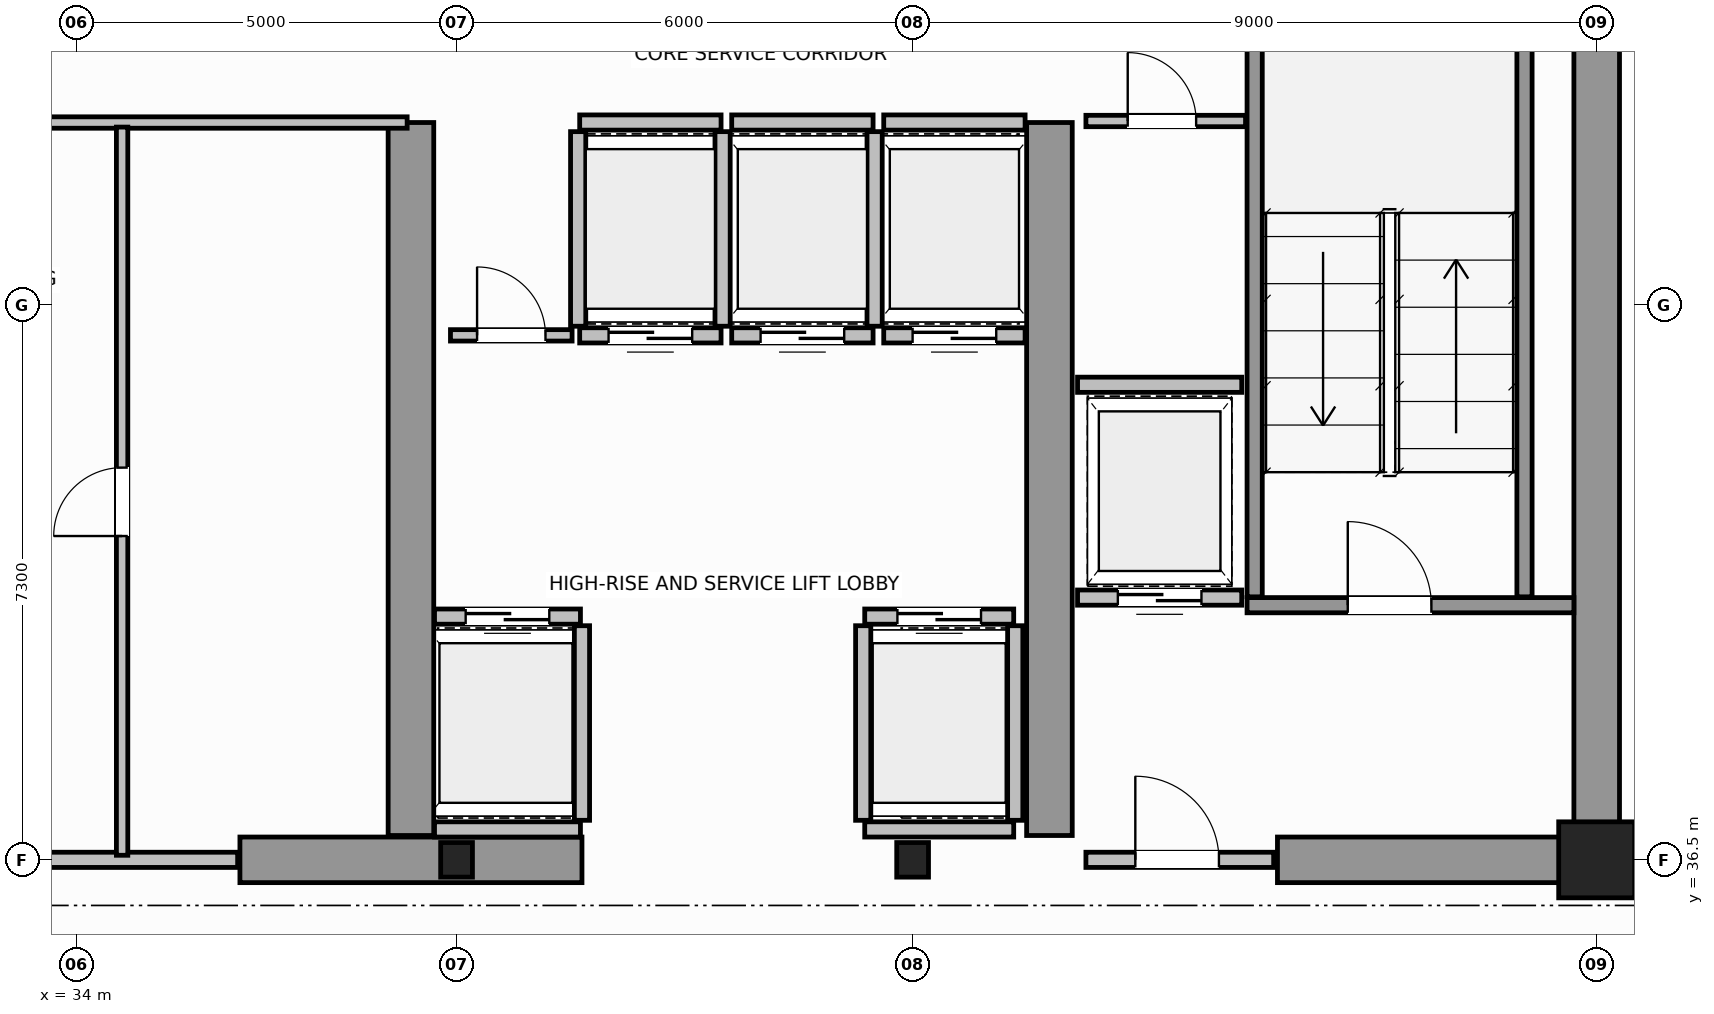
"""IFC4 building model, lengths in metres.
Left out: names, types, materials, properties, quantities, classifications, styles, units other than length and angle.
Written with IfcOpenShell. Run it as: python <this file> out.ifc"""

import sys

from ifc_helpers import new_model, si_unit, direction, frame, frame_2d, origin, origin_2d, place, context, subcontext, project, spatial, rectangle, i_section, extrude, source, transform, mapped, element, fill, save


model = new_model("IFC4")
c1 = context("Model", 3, precision=1e-05, world=origin(), true_north=direction((0.0, 1.0)))
c2 = subcontext(c1, "Body", "Model", "MODEL_VIEW")
j1 = project(units=[si_unit("LENGTHUNIT", "METRE"), si_unit("PLANEANGLEUNIT", "RADIAN")], contexts=[c1])
p1 = place(None, origin())
s1 = spatial("IfcSite", under=j1, at=p1, CompositionType="ELEMENT")
p2 = place(p1, origin())
s2 = spatial("IfcBuilding", under=s1, at=p2, CompositionType="ELEMENT")
p3 = place(p2, frame((0.0, 0.0, 234.6)))
s3 = spatial("IfcBuildingStorey", under=s2, at=p3, CompositionType="ELEMENT", Elevation=234.6)
m1 = source(origin(), c2, "Body", "SweptSolid", [
    extrude(i_section(OverallWidth=0.418, OverallDepth=0.455, WebThickness=0.042, FlangeThickness=0.058, FilletRadius=0.015, at=origin_2d()), origin(), (0.0, 0.0, 1.0), 3.8),
])
for number, where, z_axis, x_axis in (
    (1, (39.0, 36.5, 0.0), (0.0, 0.0, 1.0), (1.0, 0.0, 0.0)),
    (2, (45.0, 36.5, 0.0), (0.0, 0.0, 1.0), (1.0, 0.0, 0.0)),
):
    element("IfcColumn", number, at=place(p3, frame(where, z_axis=z_axis, x_axis=x_axis)), inside=s3, PredefinedType="COLUMN", context=c2, shape_type="MappedRepresentation", body=[
        mapped(m1, transform((0.0, 0.0, 0.0), scale=1.0)),
    ])
m2 = source(origin(), c2, "Body", "SweptSolid", [
    extrude(rectangle(XDim=1.0, YDim=1.0, at=origin_2d()), origin(), (0.0, 0.0, 1.0), 3.8),
])
p4 = place(p3, frame((54.0, 36.5, 0.0), z_axis=(0.0, 0.0, 1.0), x_axis=(1.0, 0.0, 0.0)))
e3 = element("IfcColumn", 3, at=p4, inside=s3, PredefinedType="COLUMN", context=c2, shape_type="MappedRepresentation", body=[
    mapped(m2, transform((0.0, 0.0, 0.0), scale=1.0)),
])
p5 = place(p3, frame((54.0, 36.5, 0.0), z_axis=(0.0, 0.0, 1.0), x_axis=(0.0, 1.0, 0.0)))
e4 = element("IfcWall", 4, at=p5, inside=s3, PredefinedType="SHEAR", context=c2, shape_type="SweptSolid", body=[
    extrude(rectangle(XDim=14.5, YDim=0.6, at=frame_2d((7.25, 0.0))), origin(), (0.0, 0.0, 1.0), 3.8),
])
p6 = place(p3, frame((36.15, 36.5, 0.0), z_axis=(0.0, 0.0, 1.0), x_axis=(1.0, 0.0, 0.0)))
e5 = element("IfcWall", 5, at=p6, inside=s3, PredefinedType="SHEAR", context=c2, shape_type="SweptSolid", body=[
    extrude(rectangle(XDim=4.5, YDim=0.6, at=frame_2d((2.25, 0.0))), origin(), (0.0, 0.0, 1.0), 3.8),
])
p7 = place(p3, frame((49.8, 36.5, 0.0), z_axis=(0.0, 0.0, 1.0), x_axis=(1.0, 0.0, 0.0)))
e6 = element("IfcWall", 6, at=p7, inside=s3, PredefinedType="SHEAR", context=c2, shape_type="SweptSolid", body=[
    extrude(rectangle(XDim=3.88, YDim=0.6, at=frame_2d((1.94, 0.0))), origin(), (0.0, 0.0, 1.0), 2.58),
])
for number, where, z_axis, x_axis in (
    (7, (38.4, 36.82, 0.0), (0.0, 0.0, 1.0), (0.0, 1.0, 0.0)),
    (8, (46.8, 36.82, 0.0), (0.0, 0.0, 1.0), (0.0, 1.0, 0.0)),
):
    element("IfcWall", number, at=place(p3, frame(where, z_axis=z_axis, x_axis=x_axis)), inside=s3, PredefinedType="SHEAR", context=c2, shape_type="SweptSolid", body=[
        extrude(rectangle(XDim=9.38, YDim=0.6, at=frame_2d((4.69, 0.0))), origin(), (0.0, 0.0, 1.0), 3.8),
    ])
p8 = place(p3, frame((49.4, 39.85, 0.0), z_axis=(0.0, 0.0, 1.0), x_axis=(1.0, 0.0, 0.0)))
e9 = element("IfcWall", 9, at=p8, inside=s3, PredefinedType="SOLIDWALL", context=c2, shape_type="SweptSolid", body=[
    extrude(rectangle(XDim=4.3, YDim=0.2, at=frame_2d((2.15, 0.0))), origin(), (0.0, 0.0, 1.0), 3.8),
])
p9 = place(p8, frame((1.325, 0.0, 0.0)))
e10 = element("IfcOpeningElement", 10, at=p9, cuts=e9, PredefinedType="OPENING", context=c2, shape_type="SweptSolid", body=[
    extrude(rectangle(XDim=1.1, YDim=2.15, at=frame_2d((0.55, 1.075))), frame((0.0, 0.11, 0.0), z_axis=(0.0, -1.0, 0.0), x_axis=(1.0, 0.0, 0.0)), (0.0, 0.0, 1.0), 0.22),
])
for number, where, z_axis, x_axis in (
    (11, (49.5, 39.96, 0.0), (0.0, 0.0, 1.0), (0.0, 1.0, 0.0)),
    (12, (53.05, 39.96, 0.0), (0.0, 0.0, 1.0), (0.0, 1.0, 0.0)),
):
    element("IfcWall", number, at=place(p3, frame(where, z_axis=z_axis, x_axis=x_axis)), inside=s3, PredefinedType="SOLIDWALL", context=c2, shape_type="SweptSolid", body=[
        extrude(rectangle(XDim=9.93, YDim=0.2, at=frame_2d((4.965, 0.0))), origin(), (0.0, 0.0, 1.0), 3.8),
    ])
p10 = place(p3, frame((47.28, 36.5, 0.0), z_axis=(0.0, 0.0, 1.0), x_axis=(1.0, 0.0, 0.0)))
e13 = element("IfcWall", 13, at=p10, inside=s3, PredefinedType="SOLIDWALL", context=c2, shape_type="SweptSolid", body=[
    extrude(rectangle(XDim=2.47, YDim=0.2, at=frame_2d((1.235, 0.0))), origin(), (0.0, 0.0, 1.0), 2.57),
])
p11 = place(p10, frame((0.65, 0.0, 0.0)))
e14 = element("IfcOpeningElement", 14, at=p11, cuts=e13, PredefinedType="OPENING", context=c2, shape_type="SweptSolid", body=[
    extrude(rectangle(XDim=1.1, YDim=2.15, at=frame_2d((0.55, 1.075))), frame((0.0, 0.11, 0.0), z_axis=(0.0, -1.0, 0.0), x_axis=(1.0, 0.0, 0.0)), (0.0, 0.0, 1.0), 0.22),
])
p12 = place(p3, frame((38.71, 39.7, 0.0), z_axis=(0.0, 0.0, 1.0), x_axis=(1.0, 0.0, 0.0)))
e15 = element("IfcWall", 15, at=p12, inside=s3, PredefinedType="SOLIDWALL", context=c2, shape_type="SweptSolid", body=[
    extrude(rectangle(XDim=1.92, YDim=0.2, at=frame_2d((0.96, 0.0))), origin(), (0.0, 0.0, 1.0), 3.58),
])
p13 = place(p12, frame((0.41, 0.0, 0.0)))
e16 = element("IfcOpeningElement", 16, at=p13, cuts=e15, PredefinedType="OPENING", context=c2, shape_type="SweptSolid", body=[
    extrude(rectangle(XDim=1.1, YDim=2.15, at=frame_2d((0.55, 1.075))), frame((0.0, 0.11, 0.0), z_axis=(0.0, -1.0, 0.0), x_axis=(1.0, 0.0, 0.0)), (0.0, 0.0, 1.0), 0.22),
])
p14 = place(p3, frame((38.71, 36.9, 0.0), z_axis=(0.0, 0.0, 1.0), x_axis=(1.0, 0.0, 0.0)))
e17 = element("IfcWall", 17, at=p14, inside=s3, PredefinedType="SOLIDWALL", context=c2, shape_type="SweptSolid", body=[
    extrude(rectangle(XDim=1.92, YDim=0.2, at=frame_2d((0.96, 0.0))), origin(), (0.0, 0.0, 1.0), 2.37),
])
p15 = place(p3, frame((40.65, 37.02, 0.0), z_axis=(0.0, 0.0, 1.0), x_axis=(0.0, 1.0, 0.0)))
e18 = element("IfcWall", 18, at=p15, inside=s3, PredefinedType="SOLIDWALL", context=c2, shape_type="SweptSolid", body=[
    extrude(rectangle(XDim=2.56, YDim=0.2, at=frame_2d((1.28, 0.0))), origin(), (0.0, 0.0, 1.0), 3.58),
])
p16 = place(p3, frame((44.37, 39.7, 0.0), z_axis=(0.0, 0.0, 1.0), x_axis=(1.0, 0.0, 0.0)))
e19 = element("IfcWall", 19, at=p16, inside=s3, PredefinedType="SOLIDWALL", context=c2, shape_type="SweptSolid", body=[
    extrude(rectangle(XDim=1.96, YDim=0.2, at=frame_2d((0.98, 0.0))), origin(), (0.0, 0.0, 1.0), 3.58),
])
p17 = place(p16, frame((0.43, 0.0, 0.0)))
e20 = element("IfcOpeningElement", 20, at=p17, cuts=e19, PredefinedType="OPENING", context=c2, shape_type="SweptSolid", body=[
    extrude(rectangle(XDim=1.1, YDim=2.15, at=frame_2d((0.55, 1.075))), frame((0.0, 0.11, 0.0), z_axis=(0.0, -1.0, 0.0), x_axis=(1.0, 0.0, 0.0)), (0.0, 0.0, 1.0), 0.22),
])
p18 = place(p3, frame((44.37, 36.9, 0.0), z_axis=(0.0, 0.0, 1.0), x_axis=(1.0, 0.0, 0.0)))
e21 = element("IfcWall", 21, at=p18, inside=s3, PredefinedType="SOLIDWALL", context=c2, shape_type="SweptSolid", body=[
    extrude(rectangle(XDim=1.96, YDim=0.2, at=frame_2d((0.98, 0.0))), origin(), (0.0, 0.0, 1.0), 2.37),
])
for number, where, z_axis, x_axis in (
    (22, (44.35, 37.02, 0.0), (0.0, 0.0, 1.0), (0.0, 1.0, 0.0)),
    (23, (46.35, 37.02, 0.0), (0.0, 0.0, 1.0), (0.0, 1.0, 0.0)),
):
    element("IfcWall", number, at=place(p3, frame(where, z_axis=z_axis, x_axis=x_axis)), inside=s3, PredefinedType="SOLIDWALL", context=c2, shape_type="SweptSolid", body=[
        extrude(rectangle(XDim=2.56, YDim=0.2, at=frame_2d((1.28, 0.0))), origin(), (0.0, 0.0, 1.0), 3.58),
    ])
p19 = place(p3, frame((40.62, 43.4, 0.0), z_axis=(0.0, 0.0, 1.0), x_axis=(1.0, 0.0, 0.0)))
e24 = element("IfcWall", 24, at=p19, inside=s3, PredefinedType="SOLIDWALL", context=c2, shape_type="SweptSolid", body=[
    extrude(rectangle(XDim=1.86, YDim=0.2, at=frame_2d((0.93, 0.0))), origin(), (0.0, 0.0, 1.0), 3.58),
])
p20 = place(p19, frame((0.38, 0.0, 0.0)))
e25 = element("IfcOpeningElement", 25, at=p20, cuts=e24, PredefinedType="OPENING", context=c2, shape_type="SweptSolid", body=[
    extrude(rectangle(XDim=1.1, YDim=2.15, at=frame_2d((0.55, 1.075))), frame((0.0, 0.11, 0.0), z_axis=(0.0, -1.0, 0.0), x_axis=(1.0, 0.0, 0.0)), (0.0, 0.0, 1.0), 0.22),
])
p21 = place(p3, frame((40.62, 46.2, 0.0), z_axis=(0.0, 0.0, 1.0), x_axis=(1.0, 0.0, 0.0)))
e26 = element("IfcWall", 26, at=p21, inside=s3, PredefinedType="SOLIDWALL", context=c2, shape_type="SweptSolid", body=[
    extrude(rectangle(XDim=1.86, YDim=0.2, at=frame_2d((0.93, 0.0))), origin(), (0.0, 0.0, 1.0), 3.58),
])
for number, where, z_axis, x_axis in (
    (27, (40.6, 43.52, 0.0), (0.0, 0.0, 1.0), (0.0, 1.0, 0.0)),
    (28, (42.5, 43.52, 0.0), (0.0, 0.0, 1.0), (0.0, 1.0, 0.0)),
):
    element("IfcWall", number, at=place(p3, frame(where, z_axis=z_axis, x_axis=x_axis)), inside=s3, PredefinedType="SOLIDWALL", context=c2, shape_type="SweptSolid", body=[
        extrude(rectangle(XDim=2.56, YDim=0.2, at=frame_2d((1.28, 0.0))), origin(), (0.0, 0.0, 1.0), 3.58),
    ])
p22 = place(p3, frame((42.62, 43.4, 0.0), z_axis=(0.0, 0.0, 1.0), x_axis=(1.0, 0.0, 0.0)))
e29 = element("IfcWall", 29, at=p22, inside=s3, PredefinedType="SOLIDWALL", context=c2, shape_type="SweptSolid", body=[
    extrude(rectangle(XDim=1.86, YDim=0.2, at=frame_2d((0.93, 0.0))), origin(), (0.0, 0.0, 1.0), 3.58),
])
p23 = place(p22, frame((0.38, 0.0, 0.0)))
e30 = element("IfcOpeningElement", 30, at=p23, cuts=e29, PredefinedType="OPENING", context=c2, shape_type="SweptSolid", body=[
    extrude(rectangle(XDim=1.1, YDim=2.15, at=frame_2d((0.55, 1.075))), frame((0.0, 0.11, 0.0), z_axis=(0.0, -1.0, 0.0), x_axis=(1.0, 0.0, 0.0)), (0.0, 0.0, 1.0), 0.22),
])
p24 = place(p3, frame((42.62, 46.2, 0.0), z_axis=(0.0, 0.0, 1.0), x_axis=(1.0, 0.0, 0.0)))
e31 = element("IfcWall", 31, at=p24, inside=s3, PredefinedType="SOLIDWALL", context=c2, shape_type="SweptSolid", body=[
    extrude(rectangle(XDim=1.86, YDim=0.2, at=frame_2d((0.93, 0.0))), origin(), (0.0, 0.0, 1.0), 3.58),
])
p25 = place(p3, frame((44.5, 43.52, 0.0), z_axis=(0.0, 0.0, 1.0), x_axis=(0.0, 1.0, 0.0)))
e32 = element("IfcWall", 32, at=p25, inside=s3, PredefinedType="SOLIDWALL", context=c2, shape_type="SweptSolid", body=[
    extrude(rectangle(XDim=2.56, YDim=0.2, at=frame_2d((1.28, 0.0))), origin(), (0.0, 0.0, 1.0), 2.37),
])
p26 = place(p3, frame((44.62, 43.4, 0.0), z_axis=(0.0, 0.0, 1.0), x_axis=(1.0, 0.0, 0.0)))
e33 = element("IfcWall", 33, at=p26, inside=s3, PredefinedType="SOLIDWALL", context=c2, shape_type="SweptSolid", body=[
    extrude(rectangle(XDim=1.86, YDim=0.2, at=frame_2d((0.93, 0.0))), origin(), (0.0, 0.0, 1.0), 3.58),
])
p27 = place(p26, frame((0.38, 0.0, 0.0)))
e34 = element("IfcOpeningElement", 34, at=p27, cuts=e33, PredefinedType="OPENING", context=c2, shape_type="SweptSolid", body=[
    extrude(rectangle(XDim=1.1, YDim=2.15, at=frame_2d((0.55, 1.075))), frame((0.0, 0.11, 0.0), z_axis=(0.0, -1.0, 0.0), x_axis=(1.0, 0.0, 0.0)), (0.0, 0.0, 1.0), 0.22),
])
p28 = place(p3, frame((44.62, 46.2, 0.0), z_axis=(0.0, 0.0, 1.0), x_axis=(1.0, 0.0, 0.0)))
e35 = element("IfcWall", 35, at=p28, inside=s3, PredefinedType="SOLIDWALL", context=c2, shape_type="SweptSolid", body=[
    extrude(rectangle(XDim=1.86, YDim=0.2, at=frame_2d((0.93, 0.0))), origin(), (0.0, 0.0, 1.0), 3.58),
])
p29 = place(p3, frame((47.17, 39.95, 0.0), z_axis=(0.0, 0.0, 1.0), x_axis=(1.0, 0.0, 0.0)))
e36 = element("IfcWall", 36, at=p29, inside=s3, PredefinedType="SOLIDWALL", context=c2, shape_type="SweptSolid", body=[
    extrude(rectangle(XDim=2.16, YDim=0.2, at=frame_2d((1.08, 0.0))), origin(), (0.0, 0.0, 1.0), 3.58),
])
p30 = place(p29, frame((0.53, 0.0, 0.0)))
e37 = element("IfcOpeningElement", 37, at=p30, cuts=e36, PredefinedType="OPENING", context=c2, shape_type="SweptSolid", body=[
    extrude(rectangle(XDim=1.1, YDim=2.15, at=frame_2d((0.55, 1.075))), frame((0.0, 0.11, 0.0), z_axis=(0.0, -1.0, 0.0), x_axis=(1.0, 0.0, 0.0)), (0.0, 0.0, 1.0), 0.22),
])
p31 = place(p3, frame((47.17, 42.75, 0.0), z_axis=(0.0, 0.0, 1.0), x_axis=(1.0, 0.0, 0.0)))
e38 = element("IfcWall", 38, at=p31, inside=s3, PredefinedType="SOLIDWALL", context=c2, shape_type="SweptSolid", body=[
    extrude(rectangle(XDim=2.16, YDim=0.2, at=frame_2d((1.08, 0.0))), origin(), (0.0, 0.0, 1.0), 3.58),
])
p32 = place(p3, frame((32.08, 36.5, 0.0), z_axis=(0.0, 0.0, 1.0), x_axis=(1.0, 0.0, 0.0)))
e39 = element("IfcWall", 39, at=p32, inside=s3, PredefinedType="SOLIDWALL", context=c2, shape_type="SweptSolid", body=[
    extrude(rectangle(XDim=4.04, YDim=0.2, at=frame_2d((2.02, 0.0))), origin(), (0.0, 0.0, 1.0), 2.37),
])
p33 = place(p32, frame((0.45, 0.0, 0.0)))
e40 = element("IfcOpeningElement", 40, at=p33, cuts=e39, PredefinedType="OPENING", context=c2, shape_type="SweptSolid", body=[
    extrude(rectangle(XDim=1.1, YDim=2.15, at=frame_2d((0.55, 1.075))), frame((0.0, 0.11, 0.0), z_axis=(0.0, -1.0, 0.0), x_axis=(1.0, 0.0, 0.0)), (0.0, 0.0, 1.0), 0.22),
])
p34 = place(p3, frame((29.85, 46.2, 0.0), z_axis=(0.0, 0.0, 1.0), x_axis=(1.0, 0.0, 0.0)))
e41 = element("IfcWall", 41, at=p34, inside=s3, PredefinedType="PARTITIONING", context=c2, shape_type="SweptSolid", body=[
    extrude(rectangle(XDim=8.5, YDim=0.15, at=frame_2d((4.25, 0.0))), origin(), (0.0, 0.0, 1.0), 3.58),
])
p35 = place(p3, frame((34.6, 36.56, 0.0), z_axis=(0.0, 0.0, 1.0), x_axis=(0.0, 1.0, 0.0)))
e42 = element("IfcWall", 42, at=p35, inside=s3, PredefinedType="PARTITIONING", context=c2, shape_type="SweptSolid", body=[
    extrude(rectangle(XDim=9.58, YDim=0.15, at=frame_2d((4.79, 0.0))), origin(), (0.0, 0.0, 1.0), 3.58),
])
p36 = place(p35, frame((4.2, 0.0, 0.0)))
e43 = element("IfcOpeningElement", 43, at=p36, cuts=e42, PredefinedType="OPENING", context=c2, shape_type="SweptSolid", body=[
    extrude(rectangle(XDim=0.9, YDim=2.1, at=frame_2d((0.45, 1.05))), frame((0.0, 0.085, 0.0), z_axis=(0.0, -1.0, 0.0), x_axis=(1.0, 0.0, 0.0)), (0.0, 0.0, 1.0), 0.17),
])
p37 = place(p3, frame((47.28, 46.22, 0.0), z_axis=(0.0, 0.0, 1.0), x_axis=(1.0, 0.0, 0.0)))
e44 = element("IfcWall", 44, at=p37, inside=s3, PredefinedType="PARTITIONING", context=c2, shape_type="SweptSolid", body=[
    extrude(rectangle(XDim=2.1, YDim=0.15, at=frame_2d((1.05, 0.0))), origin(), (0.0, 0.0, 1.0), 3.58),
])
p38 = place(p37, frame((0.55, 0.0, 0.0)))
e45 = element("IfcOpeningElement", 45, at=p38, cuts=e44, PredefinedType="OPENING", context=c2, shape_type="SweptSolid", body=[
    extrude(rectangle(XDim=0.9, YDim=2.1, at=frame_2d((0.45, 1.05))), frame((0.0, 0.085, 0.0), z_axis=(0.0, -1.0, 0.0), x_axis=(1.0, 0.0, 0.0)), (0.0, 0.0, 1.0), 0.17),
])
p39 = place(p3, frame((38.92, 43.4, 0.0), z_axis=(0.0, 0.0, 1.0), x_axis=(1.0, 0.0, 0.0)))
e46 = element("IfcWall", 46, at=p39, inside=s3, PredefinedType="PARTITIONING", context=c2, shape_type="SweptSolid", body=[
    extrude(rectangle(XDim=1.6, YDim=0.15, at=frame_2d((0.8, 0.0))), origin(), (0.0, 0.0, 1.0), 3.58),
])
p40 = place(p39, frame((0.35, 0.0, 0.0)))
e47 = element("IfcOpeningElement", 47, at=p40, cuts=e46, PredefinedType="OPENING", context=c2, shape_type="SweptSolid", body=[
    extrude(rectangle(XDim=0.9, YDim=2.1, at=frame_2d((0.45, 1.05))), frame((0.0, 0.085, 0.0), z_axis=(0.0, -1.0, 0.0), x_axis=(1.0, 0.0, 0.0)), (0.0, 0.0, 1.0), 0.17),
])
p41 = place(p3, frame((54.06, 36.48, 0.0), z_axis=(0.0, 0.0, 1.0), x_axis=(1.0, 0.0, 0.0)))
e48 = element("IfcWall", 48, at=p41, inside=s3, PredefinedType="PARTITIONING", context=c2, shape_type="SweptSolid", body=[
    extrude(rectangle(XDim=6.634, YDim=0.12, at=frame_2d((3.317, 0.0))), origin(), (0.0, 0.0, 1.0), 2.37),
])
p42 = place(p41, frame((2.867, 0.0, 0.0)))
e49 = element("IfcOpeningElement", 49, at=p42, cuts=e48, PredefinedType="OPENING", context=c2, shape_type="SweptSolid", body=[
    extrude(rectangle(XDim=0.9, YDim=2.15, at=frame_2d((0.45, 1.075))), frame((0.0, 0.07, 0.0), z_axis=(0.0, -1.0, 0.0), x_axis=(1.0, 0.0, 0.0)), (0.0, 0.0, 1.0), 0.14),
])
m3 = source(origin(), c2, "Body", "SweptSolid", [
    extrude(rectangle(XDim=1.1, YDim=2.15, at=frame_2d((0.55, 1.075))), frame((0.0, 0.025, 0.0), z_axis=(0.0, -1.0, 0.0), x_axis=(1.0, 0.0, 0.0)), (0.0, 0.0, 1.0), 0.05),
])
p43 = place(p9, origin())
e50 = element("IfcDoor", 50, at=p43, inside=s3, OperationType="SINGLE_SWING_RIGHT", PredefinedType="DOOR", context=c2, shape_type="MappedRepresentation", body=[
    mapped(m3, transform((0.0, 0.0, 0.0), scale=1.0)),
])
fill(e10, e50)
p44 = place(p11, origin())
e51 = element("IfcDoor", 51, at=p44, inside=s3, OperationType="SINGLE_SWING_LEFT", PredefinedType="DOOR", context=c2, shape_type="MappedRepresentation", body=[
    mapped(m3, transform((0.0, 0.0, 0.0), scale=1.0)),
])
fill(e14, e51)
p45 = place(p13, origin())
e52 = element("IfcDoor", 52, at=p45, inside=s3, OperationType="DOUBLE_DOOR_SLIDING", PredefinedType="DOOR", context=c2, shape_type="MappedRepresentation", body=[
    mapped(m3, transform((0.0, 0.0, 0.0), scale=1.0)),
])
fill(e16, e52)
p46 = place(p17, origin())
e53 = element("IfcDoor", 53, at=p46, inside=s3, OperationType="DOUBLE_DOOR_SLIDING", PredefinedType="DOOR", context=c2, shape_type="MappedRepresentation", body=[
    mapped(m3, transform((0.0, 0.0, 0.0), scale=1.0)),
])
fill(e20, e53)
p47 = place(p20, origin())
e54 = element("IfcDoor", 54, at=p47, inside=s3, OperationType="DOUBLE_DOOR_SLIDING", PredefinedType="DOOR", context=c2, shape_type="MappedRepresentation", body=[
    mapped(m3, transform((0.0, 0.0, 0.0), scale=1.0)),
])
fill(e25, e54)
p48 = place(p23, origin())
e55 = element("IfcDoor", 55, at=p48, inside=s3, OperationType="DOUBLE_DOOR_SLIDING", PredefinedType="DOOR", context=c2, shape_type="MappedRepresentation", body=[
    mapped(m3, transform((0.0, 0.0, 0.0), scale=1.0)),
])
fill(e30, e55)
p49 = place(p27, origin())
e56 = element("IfcDoor", 56, at=p49, inside=s3, OperationType="DOUBLE_DOOR_SLIDING", PredefinedType="DOOR", context=c2, shape_type="MappedRepresentation", body=[
    mapped(m3, transform((0.0, 0.0, 0.0), scale=1.0)),
])
fill(e34, e56)
p50 = place(p30, origin())
e57 = element("IfcDoor", 57, at=p50, inside=s3, OperationType="DOUBLE_DOOR_SLIDING", PredefinedType="DOOR", context=c2, shape_type="MappedRepresentation", body=[
    mapped(m3, transform((0.0, 0.0, 0.0), scale=1.0)),
])
fill(e37, e57)
m4 = source(origin(), c2, "Body", "SweptSolid", [
    extrude(rectangle(XDim=0.9, YDim=2.1, at=frame_2d((0.45, 1.05))), frame((0.0, 0.025, 0.0), z_axis=(0.0, -1.0, 0.0), x_axis=(1.0, 0.0, 0.0)), (0.0, 0.0, 1.0), 0.05),
])
p51 = place(p36, origin())
e58 = element("IfcDoor", 58, at=p51, inside=s3, OperationType="SINGLE_SWING_RIGHT", PredefinedType="DOOR", context=c2, shape_type="MappedRepresentation", body=[
    mapped(m4, transform((0.0, 0.0, 0.0), scale=1.0)),
])
fill(e43, e58)
p52 = place(p38, origin())
e59 = element("IfcDoor", 59, at=p52, inside=s3, OperationType="SINGLE_SWING_RIGHT", PredefinedType="DOOR", context=c2, shape_type="MappedRepresentation", body=[
    mapped(m4, transform((0.0, 0.0, 0.0), scale=1.0)),
])
fill(e45, e59)
p53 = place(p40, origin())
e60 = element("IfcDoor", 60, at=p53, inside=s3, OperationType="SINGLE_SWING_LEFT", PredefinedType="DOOR", context=c2, shape_type="MappedRepresentation", body=[
    mapped(m4, transform((0.0, 0.0, 0.0), scale=1.0)),
])
fill(e47, e60)
save(model, sys.argv[1])
